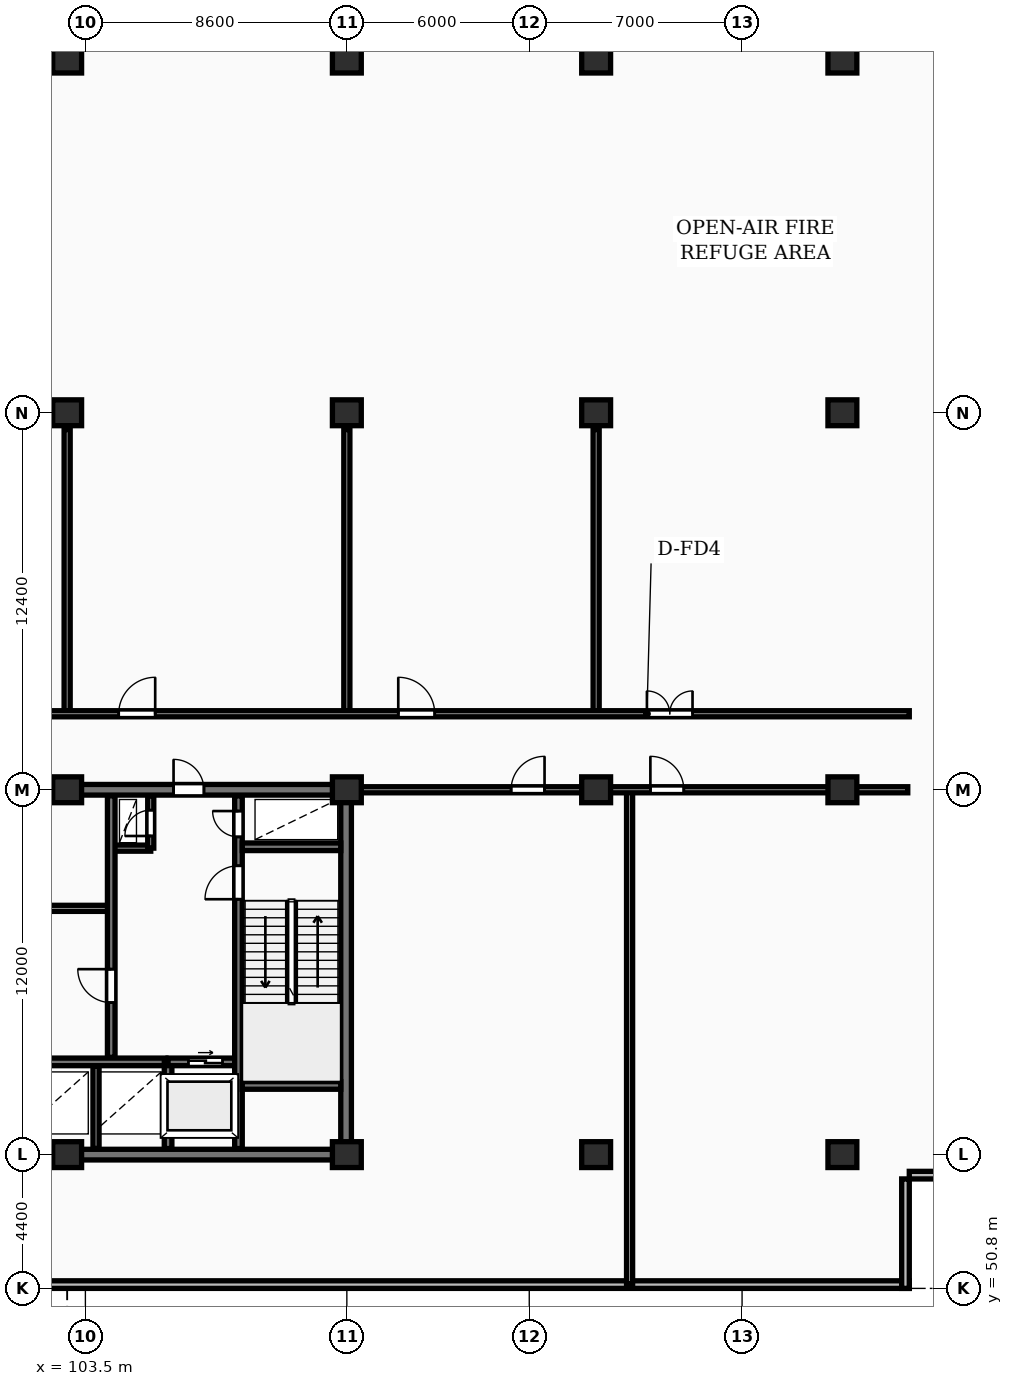
"""IFC4 building model, lengths in metres.
Left out: names, types, materials, properties, quantities, classifications, styles, units other than length and angle.
Written with IfcOpenShell. Run it as: python <this file> out.ifc"""

import sys

from ifc_helpers import new_model, si_unit, direction, frame, frame_2d, origin, origin_2d, place, context, subcontext, project, spatial, rectangle, extrude, element, fill, save


model = new_model("IFC4")
c1 = context("Model", 3, precision=1e-05, world=origin(), true_north=direction((0.0, 1.0)))
c2 = subcontext(c1, "Body", "Model", "MODEL_VIEW")
j1 = project(units=[si_unit("LENGTHUNIT", "METRE"), si_unit("PLANEANGLEUNIT", "RADIAN")], contexts=[c1])
p1 = place(None, origin())
s1 = spatial("IfcSite", under=j1, at=p1, CompositionType="ELEMENT")
p2 = place(p1, origin())
s2 = spatial("IfcBuilding", under=s1, at=p2, CompositionType="ELEMENT")
p3 = place(p2, frame((0.0, 0.0, 157.3)))
s3 = spatial("IfcBuildingStorey", under=s2, at=p3, CompositionType="ELEMENT", Elevation=157.3)
for number, where, z_axis, x_axis in (
    (1, (102.9, 55.2, 0.0), (0.0, 0.0, 1.0), (1.0, 0.0, 0.0)),
    (2, (102.9, 67.2, 0.0), (0.0, 0.0, 1.0), (1.0, 0.0, 0.0)),
    (3, (102.9, 79.6, 0.0), (0.0, 0.0, 1.0), (1.0, 0.0, 0.0)),
    (4, (102.9, 91.2, 0.0), (0.0, 0.0, 1.0), (1.0, 0.0, 0.0)),
    (5, (112.1, 55.2, 0.0), (0.0, 0.0, 1.0), (1.0, 0.0, 0.0)),
    (6, (112.1, 67.2, 0.0), (0.0, 0.0, 1.0), (1.0, 0.0, 0.0)),
    (7, (112.1, 79.6, 0.0), (0.0, 0.0, 1.0), (1.0, 0.0, 0.0)),
    (8, (112.1, 91.2, 0.0), (0.0, 0.0, 1.0), (1.0, 0.0, 0.0)),
    (9, (120.3, 55.2, 0.0), (0.0, 0.0, 1.0), (1.0, 0.0, 0.0)),
    (10, (120.3, 67.2, 0.0), (0.0, 0.0, 1.0), (1.0, 0.0, 0.0)),
    (11, (120.3, 79.6, 0.0), (0.0, 0.0, 1.0), (1.0, 0.0, 0.0)),
    (12, (120.3, 91.2, 0.0), (0.0, 0.0, 1.0), (1.0, 0.0, 0.0)),
    (13, (128.4, 55.2, 0.0), (0.0, 0.0, 1.0), (1.0, 0.0, 0.0)),
    (14, (128.4, 67.2, 0.0), (0.0, 0.0, 1.0), (1.0, 0.0, 0.0)),
    (15, (128.4, 79.6, 0.0), (0.0, 0.0, 1.0), (1.0, 0.0, 0.0)),
    (16, (128.4, 91.2, 0.0), (0.0, 0.0, 1.0), (1.0, 0.0, 0.0)),
):
    element("IfcColumn", number, at=place(p3, frame(where, z_axis=z_axis, x_axis=x_axis)), inside=s3, PredefinedType="COLUMN", context=c2, shape_type="SweptSolid", body=[
        extrude(rectangle(XDim=0.95, YDim=0.85, at=origin_2d()), origin(), (0.0, 0.0, 1.0), 4.8),
    ])
p4 = place(p3, frame((57.6, 50.925, 0.0), z_axis=(0.0, 0.0, 1.0), x_axis=(1.0, 0.0, 0.0)))
e17 = element("IfcWall", 17, at=p4, inside=s3, PredefinedType="SHEAR", context=c2, shape_type="SweptSolid", body=[
    extrude(rectangle(XDim=73.0, YDim=0.25, at=frame_2d((36.5, 0.0))), origin(), (0.0, 0.0, 1.0), 4.48),
])
for number, where, z_axis, x_axis in (
    (18, (130.475, 50.8, 0.0), (0.0, 0.0, 1.0), (0.0, 1.0, 0.0)),
    (19, (130.6, 54.525, 0.0), (0.0, 0.0, 1.0), (1.0, 0.0, 0.0)),
):
    element("IfcWall", number, at=place(p3, frame(where, z_axis=z_axis, x_axis=x_axis)), inside=s3, PredefinedType="SHEAR", context=c2, shape_type="SweptSolid", body=[
        extrude(rectangle(XDim=3.6, YDim=0.25, at=frame_2d((1.8, 0.0))), origin(), (0.0, 0.0, 1.0), 4.48),
    ])
p5 = place(p3, frame((75.95, 55.2, 0.0), z_axis=(0.0, 0.0, 1.0), x_axis=(1.0, 0.0, 0.0)))
e20 = element("IfcWall", 20, at=p5, inside=s3, PredefinedType="SHEAR", context=c2, shape_type="SweptSolid", body=[
    extrude(rectangle(XDim=36.3, YDim=0.35, at=frame_2d((18.15, 0.0))), origin(), (0.0, 0.0, 1.0), 4.8),
])
p6 = place(p3, frame((112.075, 55.375, 0.0), z_axis=(0.0, 0.0, 1.0), x_axis=(0.0, 1.0, 0.0)))
e21 = element("IfcWall", 21, at=p6, inside=s3, PredefinedType="SHEAR", context=c2, shape_type="SweptSolid", body=[
    extrude(rectangle(XDim=11.65, YDim=0.35, at=frame_2d((5.825, 0.0))), origin(), (0.0, 0.0, 1.0), 4.8),
])
p7 = place(p3, frame((75.95, 67.2, 0.0), z_axis=(0.0, 0.0, 1.0), x_axis=(1.0, 0.0, 0.0)))
e22 = element("IfcWall", 22, at=p7, inside=s3, PredefinedType="SHEAR", context=c2, shape_type="SweptSolid", body=[
    extrude(rectangle(XDim=36.3, YDim=0.35, at=frame_2d((18.15, 0.0))), origin(), (0.0, 0.0, 1.0), 4.8),
])
p8 = place(p7, frame((5.25, 0.0, 0.0)))
e23 = element("IfcOpeningElement", 23, at=p8, cuts=e22, PredefinedType="OPENING", context=c2, shape_type="SweptSolid", body=[
    extrude(rectangle(XDim=1.0, YDim=2.15, at=frame_2d((0.5, 1.075))), frame((0.0, 0.185, 0.0), z_axis=(0.0, -1.0, 0.0), x_axis=(1.0, 0.0, 0.0)), (0.0, 0.0, 1.0), 0.37),
])
p9 = place(p7, frame((21.6, 0.0, 0.0)))
e24 = element("IfcOpeningElement", 24, at=p9, cuts=e22, PredefinedType="OPENING", context=c2, shape_type="SweptSolid", body=[
    extrude(rectangle(XDim=1.5, YDim=2.2, at=frame_2d((0.75, 1.1))), frame((0.0, 0.185, 0.0), z_axis=(0.0, -1.0, 0.0), x_axis=(1.0, 0.0, 0.0)), (0.0, 0.0, 1.0), 0.37),
])
p10 = place(p7, frame((30.45, 0.0, 0.0)))
e25 = element("IfcOpeningElement", 25, at=p10, cuts=e22, PredefinedType="OPENING", context=c2, shape_type="SweptSolid", body=[
    extrude(rectangle(XDim=1.0, YDim=2.15, at=frame_2d((0.5, 1.075))), frame((0.0, 0.185, 0.0), z_axis=(0.0, -1.0, 0.0), x_axis=(1.0, 0.0, 0.0)), (0.0, 0.0, 1.0), 0.37),
])
p11 = place(p3, frame((103.85, 55.4, 0.0), z_axis=(0.0, 0.0, 1.0), x_axis=(0.0, 1.0, 0.0)))
e26 = element("IfcWall", 26, at=p11, inside=s3, PredefinedType="PARTITIONING", context=c2, shape_type="SweptSolid", body=[
    extrude(rectangle(XDim=2.72, YDim=0.2, at=frame_2d((1.36, 0.0))), origin(), (0.0, 0.0, 1.0), 4.48),
])
p12 = place(p3, frame((101.55, 58.25, 0.0), z_axis=(0.0, 0.0, 1.0), x_axis=(1.0, 0.0, 0.0)))
e27 = element("IfcWall", 27, at=p12, inside=s3, PredefinedType="SHEAR", context=c2, shape_type="SweptSolid", body=[
    extrude(rectangle(XDim=4.6, YDim=0.25, at=frame_2d((2.3, 0.0))), origin(), (0.0, 0.0, 1.0), 4.8),
])
p13 = place(p3, frame((106.22, 55.4, 0.0), z_axis=(0.0, 0.0, 1.0), x_axis=(0.0, 1.0, 0.0)))
e28 = element("IfcWall", 28, at=p13, inside=s3, PredefinedType="SHEAR", context=c2, shape_type="SweptSolid", body=[
    extrude(rectangle(XDim=2.85, YDim=0.25, at=frame_2d((1.425, 0.0))), origin(), (0.0, 0.0, 1.0), 4.8),
])
p14 = place(p3, frame((106.22, 58.25, 0.0), z_axis=(0.0, 0.0, 1.0), x_axis=(1.0, 0.0, 0.0)))
e29 = element("IfcWall", 29, at=p14, inside=s3, PredefinedType="SHEAR", context=c2, shape_type="SweptSolid", body=[
    extrude(rectangle(XDim=2.46, YDim=0.25, at=frame_2d((1.23, 0.0))), origin(), (0.0, 0.0, 1.0), 4.8),
])
p15 = place(p14, frame((0.67, 0.0, 0.0)))
e30 = element("IfcOpeningElement", 30, at=p15, cuts=e29, PredefinedType="OPENING", context=c2, shape_type="SweptSolid", body=[
    extrude(rectangle(XDim=1.12, YDim=2.12, at=frame_2d((0.56, 1.06))), frame((0.0, 0.135, 0.0), z_axis=(0.0, -1.0, 0.0), x_axis=(1.0, 0.0, 0.0)), (0.0, 0.0, 1.0), 0.27),
])
p16 = place(p3, frame((84.42, 63.3, 0.0), z_axis=(0.0, 0.0, 1.0), x_axis=(1.0, 0.0, 0.0)))
e31 = element("IfcWall", 31, at=p16, inside=s3, PredefinedType="PARTITIONING", context=c2, shape_type="SweptSolid", body=[
    extrude(rectangle(XDim=19.83, YDim=0.2, at=frame_2d((9.915, 0.0))), origin(), (0.0, 0.0, 1.0), 4.48),
])
p17 = place(p16, frame((1.15, 0.0, 0.0)))
e32 = element("IfcOpeningElement", 32, at=p17, cuts=e31, PredefinedType="OPENING", context=c2, shape_type="SweptSolid", body=[
    extrude(rectangle(XDim=0.85, YDim=2.05, at=frame_2d((0.425, 1.025))), frame((0.0, 0.11, 0.0), z_axis=(0.0, -1.0, 0.0), x_axis=(1.0, 0.0, 0.0)), (0.0, 0.0, 1.0), 0.22),
])
p18 = place(p16, frame((3.25, 0.0, 0.0)))
e33 = element("IfcOpeningElement", 33, at=p18, cuts=e31, PredefinedType="OPENING", context=c2, shape_type="SweptSolid", body=[
    extrude(rectangle(XDim=0.85, YDim=2.05, at=frame_2d((0.425, 1.025))), frame((0.0, 0.11, 0.0), z_axis=(0.0, -1.0, 0.0), x_axis=(1.0, 0.0, 0.0)), (0.0, 0.0, 1.0), 0.22),
])
p19 = place(p16, frame((13.08, 0.0, 0.0)))
e34 = element("IfcOpeningElement", 34, at=p19, cuts=e31, PredefinedType="OPENING", context=c2, shape_type="SweptSolid", body=[
    extrude(rectangle(XDim=1.5, YDim=2.2, at=frame_2d((0.75, 1.1))), frame((0.0, 0.11, 0.0), z_axis=(0.0, -1.0, 0.0), x_axis=(1.0, 0.0, 0.0)), (0.0, 0.0, 1.0), 0.22),
])
p20 = place(p16, frame((6.78, 0.0, 0.0)))
e35 = element("IfcOpeningElement", 35, at=p20, cuts=e31, PredefinedType="OPENING", context=c2, shape_type="SweptSolid", body=[
    extrude(rectangle(XDim=0.92, YDim=2.08, at=frame_2d((0.46, 1.04))), frame((0.0, 0.11, 0.0), z_axis=(0.0, -1.0, 0.0), x_axis=(1.0, 0.0, 0.0)), (0.0, 0.0, 1.0), 0.22),
])
p21 = place(p16, frame((16.28, 0.0, 0.0)))
e36 = element("IfcOpeningElement", 36, at=p21, cuts=e31, PredefinedType="OPENING", context=c2, shape_type="SweptSolid", body=[
    extrude(rectangle(XDim=0.92, YDim=2.08, at=frame_2d((0.46, 1.04))), frame((0.0, 0.11, 0.0), z_axis=(0.0, -1.0, 0.0), x_axis=(1.0, 0.0, 0.0)), (0.0, 0.0, 1.0), 0.22),
])
p22 = place(p3, frame((104.45, 65.28, 0.0), z_axis=(0.0, 0.0, 1.0), x_axis=(1.0, 0.0, 0.0)))
e37 = element("IfcWall", 37, at=p22, inside=s3, PredefinedType="PARTITIONING", context=c2, shape_type="SweptSolid", body=[
    extrude(rectangle(XDim=1.2, YDim=0.2, at=frame_2d((0.6, 0.0))), origin(), (0.0, 0.0, 1.0), 4.48),
])
p23 = place(p3, frame((105.65, 65.28, 0.0), z_axis=(0.0, 0.0, 1.0), x_axis=(0.0, 1.0, 0.0)))
e38 = element("IfcWall", 38, at=p23, inside=s3, PredefinedType="PARTITIONING", context=c2, shape_type="SweptSolid", body=[
    extrude(rectangle(XDim=1.72, YDim=0.2, at=frame_2d((0.86, 0.0))), origin(), (0.0, 0.0, 1.0), 4.48),
])
p24 = place(p23, frame((0.4, 0.0, 0.0)))
e39 = element("IfcOpeningElement", 39, at=p24, cuts=e38, PredefinedType="OPENING", context=c2, shape_type="SweptSolid", body=[
    extrude(rectangle(XDim=0.85, YDim=2.05, at=frame_2d((0.425, 1.025))), frame((0.0, 0.11, 0.0), z_axis=(0.0, -1.0, 0.0), x_axis=(1.0, 0.0, 0.0)), (0.0, 0.0, 1.0), 0.22),
])
p25 = place(p3, frame((104.35, 58.4, 0.0), z_axis=(0.0, 0.0, 1.0), x_axis=(0.0, 1.0, 0.0)))
e40 = element("IfcWall", 40, at=p25, inside=s3, PredefinedType="SHEAR", context=c2, shape_type="SweptSolid", body=[
    extrude(rectangle(XDim=8.6, YDim=0.25, at=frame_2d((4.3, 0.0))), origin(), (0.0, 0.0, 1.0), 4.8),
])
p26 = place(p25, frame((1.8, 0.0, 0.0)))
e41 = element("IfcOpeningElement", 41, at=p26, cuts=e40, PredefinedType="OPENING", context=c2, shape_type="SweptSolid", body=[
    extrude(rectangle(XDim=1.1, YDim=2.1, at=frame_2d((0.55, 1.05))), frame((0.0, 0.135, 0.0), z_axis=(0.0, -1.0, 0.0), x_axis=(1.0, 0.0, 0.0)), (0.0, 0.0, 1.0), 0.27),
])
p27 = place(p3, frame((108.535, 55.4, 0.0), z_axis=(0.0, 0.0, 1.0), x_axis=(0.0, 1.0, 0.0)))
e42 = element("IfcWall", 42, at=p27, inside=s3, PredefinedType="SHEAR", context=c2, shape_type="SweptSolid", body=[
    extrude(rectangle(XDim=11.6, YDim=0.25, at=frame_2d((5.8, 0.0))), origin(), (0.0, 0.0, 1.0), 4.8),
])
p28 = place(p27, frame((8.2, 0.0, 0.0)))
e43 = element("IfcOpeningElement", 43, at=p28, cuts=e42, PredefinedType="OPENING", context=c2, shape_type="SweptSolid", body=[
    extrude(rectangle(XDim=1.1, YDim=2.1, at=frame_2d((0.55, 1.05))), frame((0.0, 0.135, 0.0), z_axis=(0.0, -1.0, 0.0), x_axis=(1.0, 0.0, 0.0)), (0.0, 0.0, 1.0), 0.27),
])
p29 = place(p27, frame((10.25, 0.0, 0.0)))
e44 = element("IfcOpeningElement", 44, at=p29, cuts=e42, PredefinedType="OPENING", context=c2, shape_type="SweptSolid", body=[
    extrude(rectangle(XDim=0.85, YDim=2.05, at=frame_2d((0.425, 1.025))), frame((0.0, 0.135, 0.0), z_axis=(0.0, -1.0, 0.0), x_axis=(1.0, 0.0, 0.0)), (0.0, 0.0, 1.0), 0.27),
])
for number, where, z_axis, x_axis in (
    (45, (108.66, 57.475, 0.0), (0.0, 0.0, 1.0), (1.0, 0.0, 0.0)),
    (46, (108.66, 65.325, 0.0), (0.0, 0.0, 1.0), (1.0, 0.0, 0.0)),
):
    element("IfcWall", number, at=place(p3, frame(where, z_axis=z_axis, x_axis=x_axis)), inside=s3, PredefinedType="SHEAR", context=c2, shape_type="SweptSolid", body=[
        extrude(rectangle(XDim=3.24, YDim=0.25, at=frame_2d((1.62, 0.0))), origin(), (0.0, 0.0, 1.0), 4.8),
    ])
for number, where, z_axis, x_axis in (
    (47, (102.9, 69.8, 0.0), (0.0, 0.0, 1.0), (0.0, 1.0, 0.0)),
    (48, (112.1, 69.8, 0.0), (0.0, 0.0, 1.0), (0.0, 1.0, 0.0)),
    (49, (120.3, 69.8, 0.0), (0.0, 0.0, 1.0), (0.0, 1.0, 0.0)),
):
    element("IfcWall", number, at=place(p3, frame(where, z_axis=z_axis, x_axis=x_axis)), inside=s3, PredefinedType="PARTITIONING", context=c2, shape_type="SweptSolid", body=[
        extrude(rectangle(XDim=9.25, YDim=0.2, at=frame_2d((4.625, 0.0))), origin(), (0.0, 0.0, 1.0), 3.23),
    ])
p30 = place(p3, frame((57.6, 69.7, 0.0), z_axis=(0.0, 0.0, 1.0), x_axis=(1.0, 0.0, 0.0)))
e50 = element("IfcWall", 50, at=p30, inside=s3, PredefinedType="PARTITIONING", context=c2, shape_type="SweptSolid", body=[
    extrude(rectangle(XDim=73.0, YDim=0.2, at=frame_2d((36.5, 0.0))), origin(), (0.0, 0.0, 1.0), 4.48),
])
p31 = place(p30, frame((7.498, 0.0, 0.0)))
e51 = element("IfcOpeningElement", 51, at=p31, cuts=e50, PredefinedType="OPENING", context=c2, shape_type="SweptSolid", body=[
    extrude(rectangle(XDim=1.2, YDim=2.15, at=frame_2d((0.6, 1.075))), frame((0.0, 0.11, 0.0), z_axis=(0.0, -1.0, 0.0), x_axis=(1.0, 0.0, 0.0)), (0.0, 0.0, 1.0), 0.22),
])
p32 = place(p30, frame((15.621, 0.0, 0.0)))
e52 = element("IfcOpeningElement", 52, at=p32, cuts=e50, PredefinedType="OPENING", context=c2, shape_type="SweptSolid", body=[
    extrude(rectangle(XDim=1.2, YDim=2.15, at=frame_2d((0.6, 1.075))), frame((0.0, 0.11, 0.0), z_axis=(0.0, -1.0, 0.0), x_axis=(1.0, 0.0, 0.0)), (0.0, 0.0, 1.0), 0.22),
])
p33 = place(p30, frame((23.985, 0.0, 0.0)))
e53 = element("IfcOpeningElement", 53, at=p33, cuts=e50, PredefinedType="OPENING", context=c2, shape_type="SweptSolid", body=[
    extrude(rectangle(XDim=1.2, YDim=2.15, at=frame_2d((0.6, 1.075))), frame((0.0, 0.11, 0.0), z_axis=(0.0, -1.0, 0.0), x_axis=(1.0, 0.0, 0.0)), (0.0, 0.0, 1.0), 0.22),
])
p34 = place(p30, frame((33.204, 0.0, 0.0)))
e54 = element("IfcOpeningElement", 54, at=p34, cuts=e50, PredefinedType="OPENING", context=c2, shape_type="SweptSolid", body=[
    extrude(rectangle(XDim=1.2, YDim=2.15, at=frame_2d((0.6, 1.075))), frame((0.0, 0.11, 0.0), z_axis=(0.0, -1.0, 0.0), x_axis=(1.0, 0.0, 0.0)), (0.0, 0.0, 1.0), 0.22),
])
p35 = place(p30, frame((37.796, 0.0, 0.0)))
e55 = element("IfcOpeningElement", 55, at=p35, cuts=e50, PredefinedType="OPENING", context=c2, shape_type="SweptSolid", body=[
    extrude(rectangle(XDim=1.2, YDim=2.15, at=frame_2d((0.6, 1.075))), frame((0.0, 0.11, 0.0), z_axis=(0.0, -1.0, 0.0), x_axis=(1.0, 0.0, 0.0)), (0.0, 0.0, 1.0), 0.22),
])
p36 = place(p30, frame((46.996, 0.0, 0.0)))
e56 = element("IfcOpeningElement", 56, at=p36, cuts=e50, PredefinedType="OPENING", context=c2, shape_type="SweptSolid", body=[
    extrude(rectangle(XDim=1.2, YDim=2.15, at=frame_2d((0.6, 1.075))), frame((0.0, 0.11, 0.0), z_axis=(0.0, -1.0, 0.0), x_axis=(1.0, 0.0, 0.0)), (0.0, 0.0, 1.0), 0.22),
])
p37 = place(p30, frame((56.191, 0.0, 0.0)))
e57 = element("IfcOpeningElement", 57, at=p37, cuts=e50, PredefinedType="OPENING", context=c2, shape_type="SweptSolid", body=[
    extrude(rectangle(XDim=1.2, YDim=2.15, at=frame_2d((0.6, 1.075))), frame((0.0, 0.11, 0.0), z_axis=(0.0, -1.0, 0.0), x_axis=(1.0, 0.0, 0.0)), (0.0, 0.0, 1.0), 0.22),
])
p38 = place(p30, frame((64.37, 0.0, 0.0)))
e58 = element("IfcOpeningElement", 58, at=p38, cuts=e50, PredefinedType="OPENING", context=c2, shape_type="SweptSolid", body=[
    extrude(rectangle(XDim=1.5, YDim=2.18, at=frame_2d((0.75, 1.09))), frame((0.0, 0.11, 0.0), z_axis=(0.0, -1.0, 0.0), x_axis=(1.0, 0.0, 0.0)), (0.0, 0.0, 1.0), 0.22),
])
p39 = place(p3, frame((121.4, 50.95, 0.0), z_axis=(0.0, 0.0, 1.0), x_axis=(0.0, 1.0, 0.0)))
e59 = element("IfcWall", 59, at=p39, inside=s3, PredefinedType="PARTITIONING", context=c2, shape_type="SweptSolid", body=[
    extrude(rectangle(XDim=16.2, YDim=0.2, at=frame_2d((8.1, 0.0))), origin(), (0.0, 0.0, 1.0), 4.48),
])
p40 = place(p3, frame((112.25, 67.2, 0.0), z_axis=(0.0, 0.0, 1.0), x_axis=(1.0, 0.0, 0.0)))
e60 = element("IfcWall", 60, at=p40, inside=s3, PredefinedType="PARTITIONING", context=c2, shape_type="SweptSolid", body=[
    extrude(rectangle(XDim=18.3, YDim=0.2, at=frame_2d((9.15, 0.0))), origin(), (0.0, 0.0, 1.0), 3.23),
])
p41 = place(p40, frame((5.253, 0.0, 0.0)))
e61 = element("IfcOpeningElement", 61, at=p41, cuts=e60, PredefinedType="OPENING", context=c2, shape_type="SweptSolid", body=[
    extrude(rectangle(XDim=1.1, YDim=2.1, at=frame_2d((0.55, 1.05))), frame((0.0, 0.11, 0.0), z_axis=(0.0, -1.0, 0.0), x_axis=(1.0, 0.0, 0.0)), (0.0, 0.0, 1.0), 0.22),
])
p42 = place(p40, frame((9.834, 0.0, 0.0)))
e62 = element("IfcOpeningElement", 62, at=p42, cuts=e60, PredefinedType="OPENING", context=c2, shape_type="SweptSolid", body=[
    extrude(rectangle(XDim=1.1, YDim=2.1, at=frame_2d((0.55, 1.05))), frame((0.0, 0.11, 0.0), z_axis=(0.0, -1.0, 0.0), x_axis=(1.0, 0.0, 0.0)), (0.0, 0.0, 1.0), 0.22),
])
p43 = place(p10, origin())
e63 = element("IfcDoor", 63, at=p43, inside=s3, OperationType="SINGLE_SWING_LEFT", PredefinedType="DOOR", context=c2, shape_type="SweptSolid", body=[
    extrude(rectangle(XDim=1.0, YDim=2.15, at=frame_2d((0.5, 1.075))), frame((0.0, 0.025, 0.0), z_axis=(0.0, -1.0, 0.0), x_axis=(1.0, 0.0, 0.0)), (0.0, 0.0, 1.0), 0.05),
])
fill(e25, e63)
p44 = place(p15, origin())
e64 = element("IfcDoor", 64, at=p44, inside=s3, OperationType="SLIDING_TO_RIGHT", PredefinedType="DOOR", context=c2, shape_type="SweptSolid", body=[
    extrude(rectangle(XDim=1.12, YDim=2.12, at=frame_2d((0.56, 1.06))), frame((0.0, 0.025, 0.0), z_axis=(0.0, -1.0, 0.0), x_axis=(1.0, 0.0, 0.0)), (0.0, 0.0, 1.0), 0.05),
])
fill(e30, e64)
p45 = place(p24, origin())
e65 = element("IfcDoor", 65, at=p45, inside=s3, OperationType="SINGLE_SWING_LEFT", PredefinedType="DOOR", context=c2, shape_type="SweptSolid", body=[
    extrude(rectangle(XDim=0.85, YDim=2.05, at=frame_2d((0.425, 1.025))), frame((0.0, 0.025, 0.0), z_axis=(0.0, -1.0, 0.0), x_axis=(1.0, 0.0, 0.0)), (0.0, 0.0, 1.0), 0.05),
])
fill(e39, e65)
p46 = place(p26, origin())
e66 = element("IfcDoor", 66, at=p46, inside=s3, OperationType="SINGLE_SWING_RIGHT", PredefinedType="DOOR", context=c2, shape_type="SweptSolid", body=[
    extrude(rectangle(XDim=1.1, YDim=2.1, at=frame_2d((0.55, 1.05))), frame((0.0, 0.025, 0.0), z_axis=(0.0, -1.0, 0.0), x_axis=(1.0, 0.0, 0.0)), (0.0, 0.0, 1.0), 0.05),
])
fill(e41, e66)
p47 = place(p28, origin())
e67 = element("IfcDoor", 67, at=p47, inside=s3, OperationType="SINGLE_SWING_LEFT", PredefinedType="DOOR", context=c2, shape_type="SweptSolid", body=[
    extrude(rectangle(XDim=1.1, YDim=2.1, at=frame_2d((0.55, 1.05))), frame((0.0, 0.025, 0.0), z_axis=(0.0, -1.0, 0.0), x_axis=(1.0, 0.0, 0.0)), (0.0, 0.0, 1.0), 0.05),
])
fill(e43, e67)
p48 = place(p29, origin())
e68 = element("IfcDoor", 68, at=p48, inside=s3, OperationType="SINGLE_SWING_RIGHT", PredefinedType="DOOR", context=c2, shape_type="SweptSolid", body=[
    extrude(rectangle(XDim=0.85, YDim=2.05, at=frame_2d((0.425, 1.025))), frame((0.0, 0.025, 0.0), z_axis=(0.0, -1.0, 0.0), x_axis=(1.0, 0.0, 0.0)), (0.0, 0.0, 1.0), 0.05),
])
fill(e44, e68)
p49 = place(p36, origin())
e69 = element("IfcDoor", 69, at=p49, inside=s3, OperationType="SINGLE_SWING_RIGHT", PredefinedType="DOOR", context=c2, shape_type="SweptSolid", body=[
    extrude(rectangle(XDim=1.2, YDim=2.15, at=frame_2d((0.6, 1.075))), frame((0.0, 0.025, 0.0), z_axis=(0.0, -1.0, 0.0), x_axis=(1.0, 0.0, 0.0)), (0.0, 0.0, 1.0), 0.05),
])
fill(e56, e69)
p50 = place(p37, origin())
e70 = element("IfcDoor", 70, at=p50, inside=s3, OperationType="SINGLE_SWING_LEFT", PredefinedType="DOOR", context=c2, shape_type="SweptSolid", body=[
    extrude(rectangle(XDim=1.2, YDim=2.15, at=frame_2d((0.6, 1.075))), frame((0.0, 0.025, 0.0), z_axis=(0.0, -1.0, 0.0), x_axis=(1.0, 0.0, 0.0)), (0.0, 0.0, 1.0), 0.05),
])
fill(e57, e70)
p51 = place(p38, origin())
e71 = element("IfcDoor", 71, at=p51, inside=s3, OperationType="DOUBLE_DOOR_SINGLE_SWING", PredefinedType="DOOR", context=c2, shape_type="SweptSolid", body=[
    extrude(rectangle(XDim=1.5, YDim=2.18, at=frame_2d((0.75, 1.09))), frame((0.0, 0.025, 0.0), z_axis=(0.0, -1.0, 0.0), x_axis=(1.0, 0.0, 0.0)), (0.0, 0.0, 1.0), 0.05),
])
fill(e58, e71)
p52 = place(p41, origin())
e72 = element("IfcDoor", 72, at=p52, inside=s3, OperationType="SINGLE_SWING_RIGHT", PredefinedType="DOOR", context=c2, shape_type="SweptSolid", body=[
    extrude(rectangle(XDim=1.1, YDim=2.1, at=frame_2d((0.55, 1.05))), frame((0.0, 0.025, 0.0), z_axis=(0.0, -1.0, 0.0), x_axis=(1.0, 0.0, 0.0)), (0.0, 0.0, 1.0), 0.05),
])
fill(e61, e72)
p53 = place(p42, origin())
e73 = element("IfcDoor", 73, at=p53, inside=s3, OperationType="SINGLE_SWING_LEFT", PredefinedType="DOOR", context=c2, shape_type="SweptSolid", body=[
    extrude(rectangle(XDim=1.1, YDim=2.1, at=frame_2d((0.55, 1.05))), frame((0.0, 0.025, 0.0), z_axis=(0.0, -1.0, 0.0), x_axis=(1.0, 0.0, 0.0)), (0.0, 0.0, 1.0), 0.05),
])
fill(e62, e73)
save(model, sys.argv[1])
